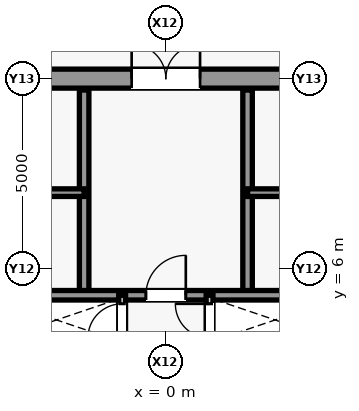
"""IFC4 building model, lengths in metres.
Left out: names, types, materials, properties, quantities, classifications, styles, units other than length and angle.
Written with IfcOpenShell. Run it as: python <this file> out.ifc"""

import sys

from ifc_helpers import new_model, si_unit, direction, frame, frame_2d, origin, place, context, subcontext, project, spatial, rectangle, extrude, source, transform, mapped, element, fill, save


model = new_model("IFC4")
c1 = context("Model", 3, precision=1e-05, world=origin(), true_north=direction((0.0, 1.0)))
c2 = subcontext(c1, "Body", "Model", "MODEL_VIEW")
j1 = project(units=[si_unit("LENGTHUNIT", "METRE"), si_unit("PLANEANGLEUNIT", "RADIAN")], contexts=[c1])
p1 = place(None, origin())
s1 = spatial("IfcSite", under=j1, at=p1, CompositionType="ELEMENT")
p2 = place(p1, origin())
s2 = spatial("IfcBuilding", under=s1, at=p2, CompositionType="ELEMENT")
p3 = place(p2, frame((0.0, 0.0, -4.8)))
s3 = spatial("IfcBuildingStorey", under=s2, at=p3, CompositionType="ELEMENT", Elevation=-4.8)
m1 = source(origin(), c2, "Body", "SweptSolid", [
    extrude(rectangle(XDim=9.2, YDim=0.5, at=frame_2d((4.6, 0.0))), origin(), (0.0, 0.0, 1.0), 4.48),
])
p4 = place(p3, frame((-4.6, 11.0, 0.0), z_axis=(0.0, 0.0, 1.0), x_axis=(1.0, 0.0, 0.0)))
e1 = element("IfcWall", 1, at=p4, inside=s3, PredefinedType="SHEAR", context=c2, shape_type="MappedRepresentation", body=[
    mapped(m1, transform((0.0, 0.0, 0.0), scale=1.0)),
])
m2 = source(origin(), c2, "Body", "SweptSolid", [
    extrude(rectangle(XDim=1.8, YDim=2.25, at=frame_2d((0.9, 1.125))), frame((0.0, 0.26, 0.0), z_axis=(0.0, -1.0, 0.0), x_axis=(1.0, 0.0, 0.0)), (0.0, 0.0, 1.0), 0.52),
])
p5 = place(p4, frame((3.7, 0.0, 0.0)))
e2 = element("IfcOpeningElement", 2, at=p5, cuts=e1, PredefinedType="OPENING", context=c2, shape_type="MappedRepresentation", body=[
    mapped(m2, transform((0.0, 0.0, 0.0), scale=1.0)),
])
m3 = source(origin(), c2, "Body", "SweptSolid", [
    extrude(rectangle(XDim=5.4, YDim=0.25, at=frame_2d((2.7, 0.0))), origin(), (0.0, 0.0, 1.0), 4.48),
])
for number, where, z_axis, x_axis in (
    (3, (-2.15, 5.3, 0.0), (0.0, 0.0, 1.0), (0.0, 1.0, 0.0)),
    (4, (2.15, 5.3, 0.0), (0.0, 0.0, 1.0), (0.0, 1.0, 0.0)),
):
    element("IfcWall", number, at=place(p3, frame(where, z_axis=z_axis, x_axis=x_axis)), inside=s3, PredefinedType="SHEAR", context=c2, shape_type="MappedRepresentation", body=[
        mapped(m3, transform((0.0, 0.0, 0.0), scale=1.0)),
    ])
m4 = source(origin(), c2, "Body", "SweptSolid", [
    extrude(rectangle(XDim=2.45, YDim=0.2, at=frame_2d((1.225, 0.0))), origin(), (0.0, 0.0, 1.0), 4.48),
])
for number, where, z_axis, x_axis in (
    (5, (-4.6, 8.0, 0.0), (0.0, 0.0, 1.0), (1.0, 0.0, 0.0)),
    (6, (2.15, 8.0, 0.0), (0.0, 0.0, 1.0), (1.0, 0.0, 0.0)),
):
    element("IfcWall", number, at=place(p3, frame(where, z_axis=z_axis, x_axis=x_axis)), inside=s3, PredefinedType="SHEAR", context=c2, shape_type="MappedRepresentation", body=[
        mapped(m4, transform((0.0, 0.0, 0.0), scale=1.0)),
    ])
m5 = source(origin(), c2, "Body", "SweptSolid", [
    extrude(rectangle(XDim=9.2, YDim=0.25, at=frame_2d((4.6, 0.0))), origin(), (0.0, 0.0, 1.0), 4.48),
])
p6 = place(p3, frame((-4.6, 5.3, 0.0), z_axis=(0.0, 0.0, 1.0), x_axis=(1.0, 0.0, 0.0)))
e7 = element("IfcWall", 7, at=p6, inside=s3, PredefinedType="SHEAR", context=c2, shape_type="MappedRepresentation", body=[
    mapped(m5, transform((0.0, 0.0, 0.0), scale=1.0)),
])
m6 = source(origin(), c2, "Body", "SweptSolid", [
    extrude(rectangle(XDim=1.05, YDim=2.2, at=frame_2d((0.525, 1.1))), frame((0.0, 0.135, 0.0), z_axis=(0.0, -1.0, 0.0), x_axis=(1.0, 0.0, 0.0)), (0.0, 0.0, 1.0), 0.27),
])
p7 = place(p6, frame((4.075, 0.0, 0.0)))
e8 = element("IfcOpeningElement", 8, at=p7, cuts=e7, PredefinedType="OPENING", context=c2, shape_type="MappedRepresentation", body=[
    mapped(m6, transform((0.0, 0.0, 0.0), scale=1.0)),
])
m7 = source(origin(), c2, "Body", "SweptSolid", [
    extrude(rectangle(XDim=10.6, YDim=0.18, at=frame_2d((5.3, 0.0))), origin(), (0.0, 0.0, 1.0), 4.48),
])
p8 = place(p3, frame((-1.15, -5.3, 0.0), z_axis=(0.0, 0.0, 1.0), x_axis=(0.0, 1.0, 0.0)))
e9 = element("IfcWall", 9, at=p8, inside=s3, PredefinedType="PARTITIONING", context=c2, shape_type="MappedRepresentation", body=[
    mapped(m7, transform((0.0, 0.0, 0.0), scale=1.0)),
])
m8 = source(origin(), c2, "Body", "SweptSolid", [
    extrude(rectangle(XDim=0.9, YDim=2.15, at=frame_2d((0.45, 1.075))), frame((0.0, 0.1, 0.0), z_axis=(0.0, -1.0, 0.0), x_axis=(1.0, 0.0, 0.0)), (0.0, 0.0, 1.0), 0.2),
])
p9 = place(p8, frame((1.9, 0.0, 0.0)))
e10 = element("IfcOpeningElement", 10, at=p9, cuts=e9, PredefinedType="OPENING", context=c2, shape_type="MappedRepresentation", body=[
    mapped(m8, transform((0.0, 0.0, 0.0), scale=1.0)),
])
p10 = place(p8, frame((6.55, 0.0, 0.0)))
e11 = element("IfcOpeningElement", 11, at=p10, cuts=e9, PredefinedType="OPENING", context=c2, shape_type="MappedRepresentation", body=[
    mapped(m8, transform((0.0, 0.0, 0.0), scale=1.0)),
])
p11 = place(p8, frame((9.475, 0.0, 0.0)))
e12 = element("IfcOpeningElement", 12, at=p11, cuts=e9, PredefinedType="OPENING", context=c2, shape_type="MappedRepresentation", body=[
    mapped(m8, transform((0.0, 0.0, 0.0), scale=1.0)),
])
p12 = place(p3, frame((1.15, -5.3, 0.0), z_axis=(0.0, 0.0, 1.0), x_axis=(0.0, 1.0, 0.0)))
e13 = element("IfcWall", 13, at=p12, inside=s3, PredefinedType="PARTITIONING", context=c2, shape_type="MappedRepresentation", body=[
    mapped(m7, transform((0.0, 0.0, 0.0), scale=1.0)),
])
p13 = place(p12, frame((0.85, 0.0, 0.0)))
e14 = element("IfcOpeningElement", 14, at=p13, cuts=e13, PredefinedType="OPENING", context=c2, shape_type="MappedRepresentation", body=[
    mapped(m8, transform((0.0, 0.0, 0.0), scale=1.0)),
])
p14 = place(p12, frame((3.55, 0.0, 0.0)))
e15 = element("IfcOpeningElement", 15, at=p14, cuts=e13, PredefinedType="OPENING", context=c2, shape_type="MappedRepresentation", body=[
    mapped(m8, transform((0.0, 0.0, 0.0), scale=1.0)),
])
p15 = place(p12, frame((6.3, 0.0, 0.0)))
e16 = element("IfcOpeningElement", 16, at=p15, cuts=e13, PredefinedType="OPENING", context=c2, shape_type="MappedRepresentation", body=[
    mapped(m8, transform((0.0, 0.0, 0.0), scale=1.0)),
])
p16 = place(p12, frame((8.25, 0.0, 0.0)))
e17 = element("IfcOpeningElement", 17, at=p16, cuts=e13, PredefinedType="OPENING", context=c2, shape_type="MappedRepresentation", body=[
    mapped(m8, transform((0.0, 0.0, 0.0), scale=1.0)),
])
p17 = place(p12, frame((9.475, 0.0, 0.0)))
e18 = element("IfcOpeningElement", 18, at=p17, cuts=e13, PredefinedType="OPENING", context=c2, shape_type="MappedRepresentation", body=[
    mapped(m8, transform((0.0, 0.0, 0.0), scale=1.0)),
])
m9 = source(origin(), c2, "Body", "SweptSolid", [
    extrude(rectangle(XDim=1.05, YDim=2.2, at=frame_2d((0.525, 1.1))), frame((0.0, 0.025, 0.0), z_axis=(0.0, -1.0, 0.0), x_axis=(1.0, 0.0, 0.0)), (0.0, 0.0, 1.0), 0.05),
])
p18 = place(p7, origin())
e19 = element("IfcDoor", 19, at=p18, inside=s3, OperationType="SINGLE_SWING_RIGHT", PredefinedType="DOOR", context=c2, shape_type="MappedRepresentation", body=[
    mapped(m9, transform((0.0, 0.0, 0.0), scale=1.0)),
])
fill(e8, e19)
m10 = source(origin(), c2, "Body", "SweptSolid", [
    extrude(rectangle(XDim=1.8, YDim=2.25, at=frame_2d((0.9, 1.125))), frame((0.0, 0.025, 0.0), z_axis=(0.0, -1.0, 0.0), x_axis=(1.0, 0.0, 0.0)), (0.0, 0.0, 1.0), 0.05),
])
p19 = place(p5, origin())
e20 = element("IfcDoor", 20, at=p19, inside=s3, OperationType="SINGLE_SWING_RIGHT", PredefinedType="DOOR", context=c2, shape_type="MappedRepresentation", body=[
    mapped(m10, transform((0.0, 0.0, 0.0), scale=1.0)),
])
fill(e2, e20)
m11 = source(origin(), c2, "Body", "SweptSolid", [
    extrude(rectangle(XDim=0.9, YDim=2.15, at=frame_2d((0.45, 1.075))), frame((0.0, 0.025, 0.0), z_axis=(0.0, -1.0, 0.0), x_axis=(1.0, 0.0, 0.0)), (0.0, 0.0, 1.0), 0.05),
])
p20 = place(p11, origin())
e21 = element("IfcDoor", 21, at=p20, inside=s3, OperationType="SINGLE_SWING_LEFT", PredefinedType="DOOR", context=c2, shape_type="MappedRepresentation", body=[
    mapped(m11, transform((0.0, 0.0, 0.0), scale=1.0)),
])
fill(e12, e21)
p21 = place(p17, origin())
e22 = element("IfcDoor", 22, at=p21, inside=s3, OperationType="SINGLE_SWING_RIGHT", PredefinedType="DOOR", context=c2, shape_type="MappedRepresentation", body=[
    mapped(m11, transform((0.0, 0.0, 0.0), scale=1.0)),
])
fill(e18, e22)
save(model, sys.argv[1])
